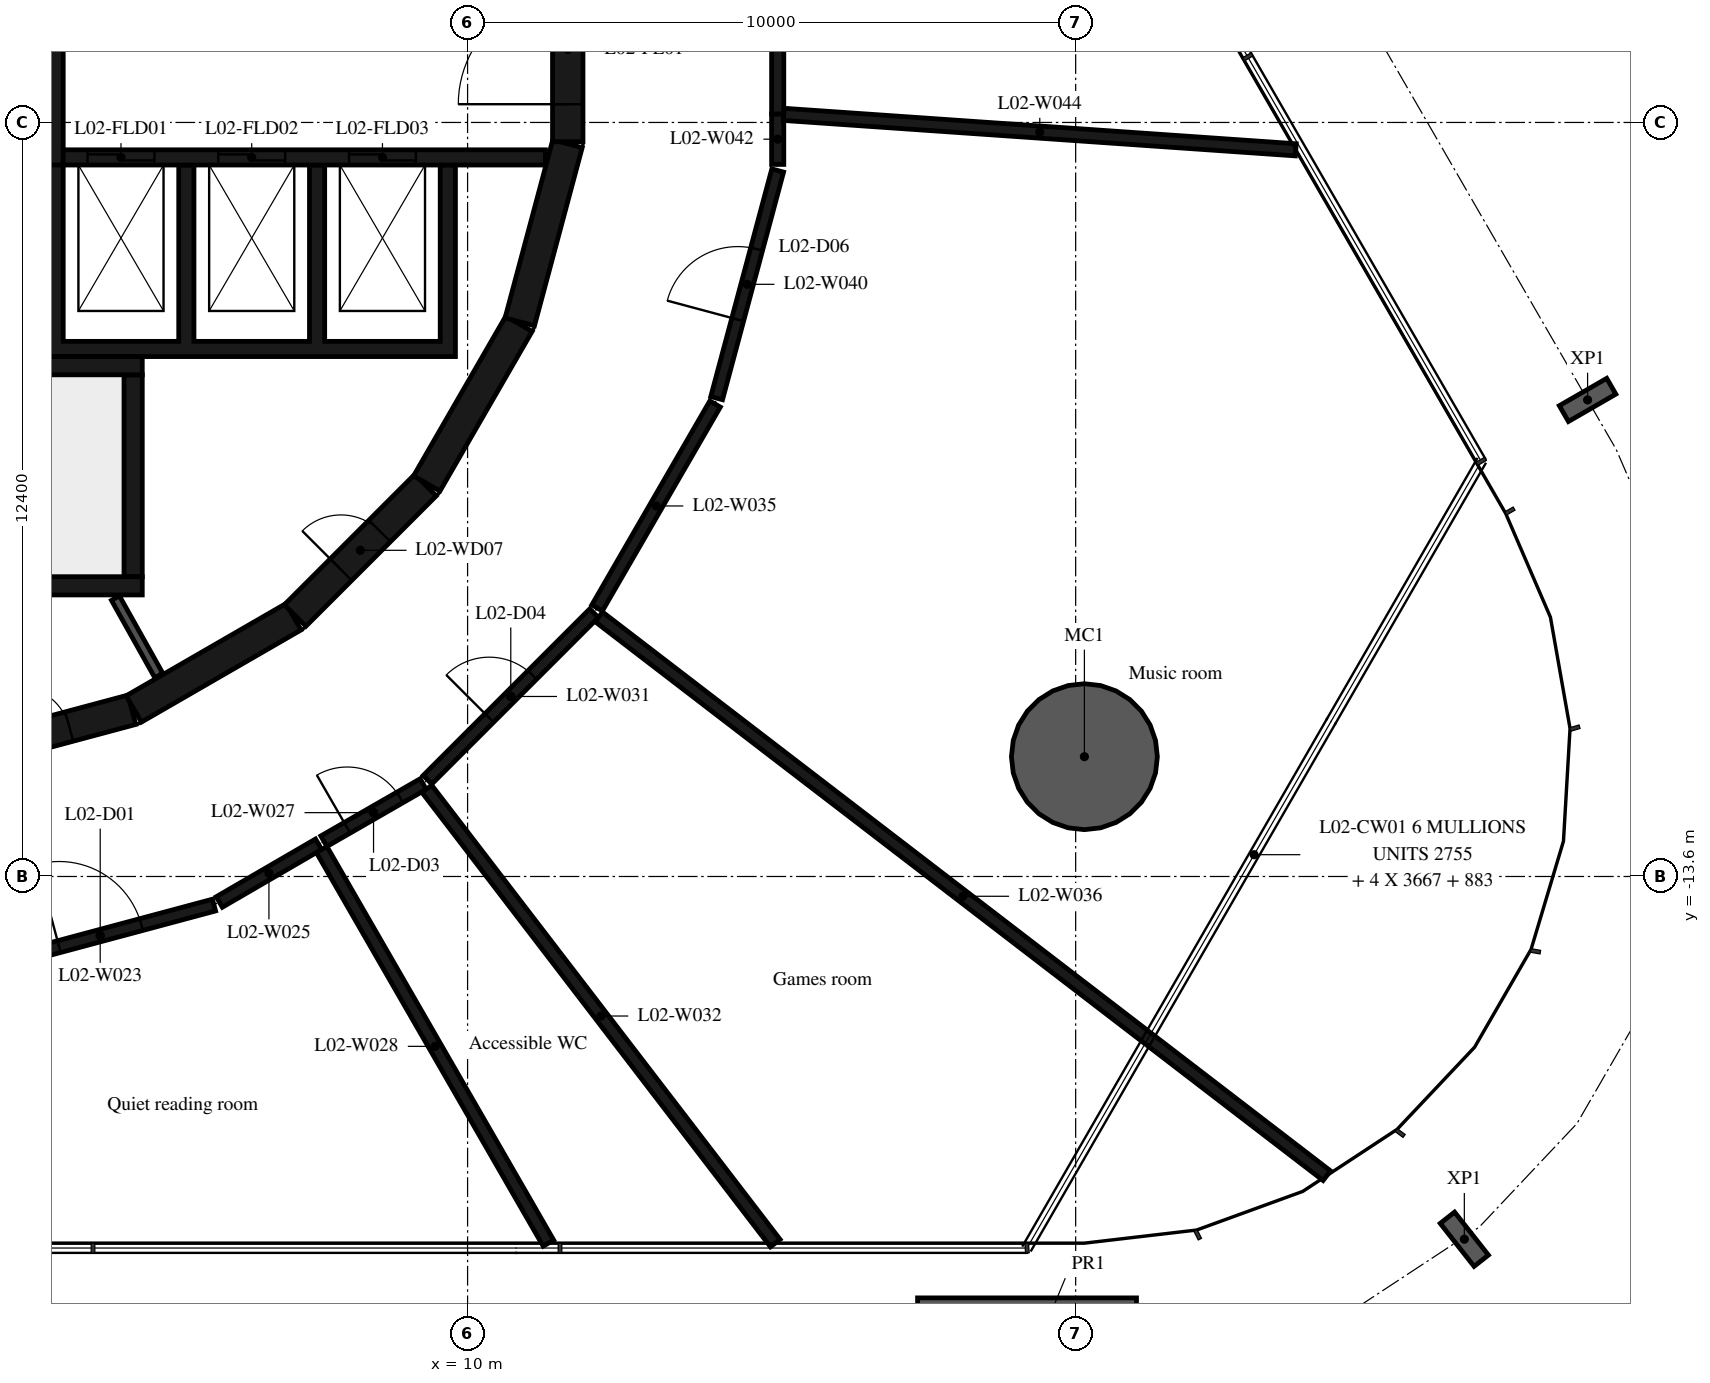
"""IFC4 building model, lengths in metres.
Left out: names, types, materials, properties, quantities, classifications, styles, units other than length and angle.
Written with IfcOpenShell. Run it as: python <this file> out.ifc"""

import sys

from ifc_helpers import new_model, si_unit, direction, frame, frame_2d, origin, origin_2d, place, context, subcontext, project, spatial, polyline, rectangle, hollow_circle, i_section, outline, extrude, element, fill, save


model = new_model("IFC4")
c1 = context("Model", 3, precision=1e-05, world=origin(), true_north=direction((0.0, 1.0)))
c2 = subcontext(c1, "Body", "Model", "MODEL_VIEW")
j1 = project(units=[si_unit("LENGTHUNIT", "METRE"), si_unit("PLANEANGLEUNIT", "RADIAN")], contexts=[c1])
p1 = place(None, origin())
s1 = spatial("IfcSite", under=j1, at=p1, CompositionType="ELEMENT")
p2 = place(p1, origin())
s2 = spatial("IfcBuilding", under=s1, at=p2, CompositionType="ELEMENT")
p3 = place(p2, frame((0.0, 0.0, 13.8)))
s3 = spatial("IfcBuildingStorey", under=s2, at=p3, CompositionType="ELEMENT", Elevation=13.8)
p4 = place(p3, frame((20.144, -11.63, -0.38), z_axis=(0.0, 0.0, 1.0), x_axis=(1.0, 0.0, 0.0)))
e1 = element("IfcColumn", 1, at=p4, inside=s3, PredefinedType="COLUMN", context=c2, shape_type="SweptSolid", body=[
    extrude(hollow_circle(Radius=1.2, WallThickness=0.06, at=origin_2d()), origin(), (0.0, 0.0, 1.0), 4.8),
])
for number, where, z_axis, x_axis in (
    (2, (26.392, -19.565, -0.38), (0.0, 0.0, 1.0), (-0.786, -0.619, 0.0)),
    (3, (28.419, -5.763, -0.38), (0.0, 0.0, 1.0), (0.5, -0.866, 0.0)),
):
    element("IfcColumn", number, at=place(p3, frame(where, z_axis=z_axis, x_axis=x_axis)), inside=s3, PredefinedType="COLUMN", context=c2, shape_type="SweptSolid", body=[
        extrude(i_section(OverallWidth=0.3, OverallDepth=0.9, WebThickness=0.019, FlangeThickness=0.035, FilletRadius=0.03, at=origin_2d()), origin(), (0.0, 0.0, 1.0), 4.8),
    ])
p5 = place(p3, frame((19.2, -21.73, -0.38), z_axis=(0.0, 0.0, 1.0), x_axis=(1.0, 0.0, 0.0)))
e4 = element("IfcColumn", 4, at=p5, inside=s3, PredefinedType="COLUMN", context=c2, shape_type="SweptSolid", body=[
    extrude(rectangle(XDim=3.6, YDim=2.4, at=origin_2d()), origin(), (0.0, 0.0, 1.0), 4.8),
])
p6 = place(p3, frame((1.55, -11.643, 0.0), z_axis=(0.0, 0.0, 1.0), x_axis=(0.965948410781, 0.258734743916, 0.0)))
e5 = element("IfcWall", 5, at=p6, inside=s3, PredefinedType="SHEAR", context=c2, shape_type="SweptSolid", body=[
    extrude(rectangle(XDim=3.033, YDim=0.5, at=frame_2d((1.516, 0.0))), origin(), (0.0, 0.0, 1.0), 4.42),
])
p7 = place(p6, frame((1.066, 0.0, 0.0)))
e6 = element("IfcOpeningElement", 6, at=p7, cuts=e5, PredefinedType="OPENING", context=c2, shape_type="SweptSolid", body=[
    extrude(rectangle(XDim=0.9, YDim=2.1, at=frame_2d((0.45, 1.05))), frame((0.0, 0.26, 0.0), z_axis=(0.0, -1.0, 0.0), x_axis=(1.0, 0.0, 0.0)), (0.0, 0.0, 1.0), 0.52),
])
p8 = place(p3, frame((4.51, -10.845, 0.0), z_axis=(0.0, 0.0, 1.0), x_axis=(0.865975092491, 0.500087131594, 0.0)))
e7 = element("IfcWall", 7, at=p8, inside=s3, PredefinedType="SHEAR", context=c2, shape_type="SweptSolid", body=[
    extrude(rectangle(XDim=3.033, YDim=0.5, at=frame_2d((1.516, 0.0))), origin(), (0.0, 0.0, 1.0), 4.42),
])
p9 = place(p3, frame((7.164, -9.308, 0.0), z_axis=(0.0, 0.0, 1.0), x_axis=(0.707106781187, 0.707106781187, 0.0)))
e8 = element("IfcWall", 8, at=p9, inside=s3, PredefinedType="SHEAR", context=c2, shape_type="SweptSolid", body=[
    extrude(rectangle(XDim=3.032, YDim=0.5, at=frame_2d((1.516, 0.0))), origin(), (0.0, 0.0, 1.0), 4.42),
])
p10 = place(p9, frame((1.066, 0.0, 0.0)))
e9 = element("IfcOpeningElement", 9, at=p10, cuts=e8, PredefinedType="OPENING", context=c2, shape_type="SweptSolid", body=[
    extrude(rectangle(XDim=0.9, YDim=2.1, at=frame_2d((0.45, 1.05))), frame((0.0, 0.26, 0.0), z_axis=(0.0, -1.0, 0.0), x_axis=(1.0, 0.0, 0.0)), (0.0, 0.0, 1.0), 0.52),
])
for number, where, z_axis, x_axis in (
    (10, (9.329, -7.137, 0.0), (0.0, 0.0, 1.0), (0.5, 0.866, 0.0)),
    (11, (10.858, -4.479, 0.0), (0.0, 0.0, 1.0), (0.259, 0.966, 0.0)),
):
    element("IfcWall", number, at=place(p3, frame(where, z_axis=z_axis, x_axis=x_axis)), inside=s3, PredefinedType="SHEAR", context=c2, shape_type="SweptSolid", body=[
        extrude(rectangle(XDim=3.033, YDim=0.5, at=frame_2d((1.516, 0.0))), origin(), (0.0, 0.0, 1.0), 4.42),
    ])
p11 = place(p3, frame((11.647, -1.516, 0.0), z_axis=(0.0, 0.0, 1.0), x_axis=(0.0, 1.0, 0.0)))
e12 = element("IfcWall", 12, at=p11, inside=s3, PredefinedType="SHEAR", context=c2, shape_type="SweptSolid", body=[
    extrude(rectangle(XDim=3.033, YDim=0.5, at=frame_2d((1.516, 0.0))), origin(), (0.0, 0.0, 1.0), 4.42),
])
p12 = place(p11, frame((0.616, 0.0, 0.0)))
e13 = element("IfcOpeningElement", 13, at=p12, cuts=e12, PredefinedType="OPENING", context=c2, shape_type="SweptSolid", body=[
    extrude(rectangle(XDim=1.8, YDim=2.1, at=frame_2d((0.9, 1.05))), frame((0.0, 0.26, 0.0), z_axis=(0.0, -1.0, 0.0), x_axis=(1.0, 0.0, 0.0)), (0.0, 0.0, 1.0), 0.52),
])
p13 = place(p3, frame((-2.4, -5.2, 0.0), z_axis=(0.0, 0.0, 1.0), x_axis=(1.0, 0.0, 0.0)))
e14 = element("IfcWall", 14, at=p13, inside=s3, PredefinedType="SHEAR", context=c2, shape_type="SweptSolid", body=[
    extrude(rectangle(XDim=7.05, YDim=0.3, at=frame_2d((3.525, 0.0))), origin(), (0.0, 0.0, 1.0), 4.42),
])
p14 = place(p3, frame((4.5, -8.67, 0.0), z_axis=(0.0, 0.0, 1.0), x_axis=(0.0, 1.0, 0.0)))
e15 = element("IfcWall", 15, at=p14, inside=s3, PredefinedType="SHEAR", context=c2, shape_type="SweptSolid", body=[
    extrude(rectangle(XDim=3.32, YDim=0.3, at=frame_2d((1.66, 0.0))), origin(), (0.0, 0.0, 1.0), 4.42),
])
p15 = place(p3, frame((0.1, -8.82, 0.0), z_axis=(0.0, 0.0, 1.0), x_axis=(1.0, 0.0, 0.0)))
e16 = element("IfcWall", 16, at=p15, inside=s3, PredefinedType="SHEAR", context=c2, shape_type="SweptSolid", body=[
    extrude(rectangle(XDim=4.55, YDim=0.3, at=frame_2d((2.275, 0.0))), origin(), (0.0, 0.0, 1.0), 4.42),
])
p16 = place(p3, origin())
e17 = element("IfcWall", 17, at=p16, inside=s3, PredefinedType="SHEAR", context=c2, shape_type="SweptSolid", body=[
    extrude(outline(polyline([(9.8, -5.05), (9.8, -4.8), (9.8, -1.9), (9.55, -1.9), (9.55, -4.8), (7.65, -4.8), (7.65, -1.9), (7.4, -1.9), (7.4, -4.8), (5.5, -4.8), (5.5, -1.9), (5.25, -1.9), (5.25, -4.8), (3.35, -4.8), (3.35, -1.9), (3.1, -1.9), (3.1, -4.8), (-5.25, -4.8), (-5.25, -1.9), (-5.5, -1.9), (-5.5, -4.8), (-7.4, -4.8), (-7.4, -1.9), (-7.65, -1.9), (-7.65, -4.8), (-9.55, -4.8), (-9.55, -1.9), (-9.8, -1.9), (-9.8, -4.8), (-9.8, -5.05), (9.8, -5.05)])), origin(), (0.0, 0.0, 1.0), 4.42),
])
p17 = place(p3, frame((3.35, -1.775, 0.0), z_axis=(0.0, 0.0, 1.0), x_axis=(1.0, 0.0, 0.0)))
e18 = element("IfcWall", 18, at=p17, inside=s3, PredefinedType="SHEAR", context=c2, shape_type="SweptSolid", body=[
    extrude(rectangle(XDim=7.93, YDim=0.25, at=frame_2d((3.965, 0.0))), origin(), (0.0, 0.0, 1.0), 4.42),
])
p18 = place(p17, frame((0.4, 0.0, 0.0)))
e19 = element("IfcOpeningElement", 19, at=p18, cuts=e18, PredefinedType="OPENING", context=c2, shape_type="SweptSolid", body=[
    extrude(rectangle(XDim=1.1, YDim=2.4, at=frame_2d((0.55, 1.2))), frame((0.0, 0.135, 0.0), z_axis=(0.0, -1.0, 0.0), x_axis=(1.0, 0.0, 0.0)), (0.0, 0.0, 1.0), 0.27),
])
p19 = place(p17, frame((2.55, 0.0, 0.0)))
e20 = element("IfcOpeningElement", 20, at=p19, cuts=e18, PredefinedType="OPENING", context=c2, shape_type="SweptSolid", body=[
    extrude(rectangle(XDim=1.1, YDim=2.4, at=frame_2d((0.55, 1.2))), frame((0.0, 0.135, 0.0), z_axis=(0.0, -1.0, 0.0), x_axis=(1.0, 0.0, 0.0)), (0.0, 0.0, 1.0), 0.27),
])
p20 = place(p17, frame((4.7, 0.0, 0.0)))
e21 = element("IfcOpeningElement", 21, at=p20, cuts=e18, PredefinedType="OPENING", context=c2, shape_type="SweptSolid", body=[
    extrude(rectangle(XDim=1.1, YDim=2.4, at=frame_2d((0.55, 1.2))), frame((0.0, 0.135, 0.0), z_axis=(0.0, -1.0, 0.0), x_axis=(1.0, 0.0, 0.0)), (0.0, 0.0, 1.0), 0.27),
])
p21 = place(p3, frame((3.225, -1.9, 0.0), z_axis=(0.0, 0.0, 1.0), x_axis=(0.0, 1.0, 0.0)))
e22 = element("IfcWall", 22, at=p21, inside=s3, PredefinedType="SHEAR", context=c2, shape_type="SweptSolid", body=[
    extrude(rectangle(XDim=3.8, YDim=0.25, at=frame_2d((1.9, 0.0))), origin(), (0.0, 0.0, 1.0), 4.42),
])
p22 = place(p3, frame((4.922, -10.296, 0.0), z_axis=(0.0, 0.0, 1.0), x_axis=(-0.48860846254, 0.872503163509, 0.0)))
e23 = element("IfcWall", 23, at=p22, inside=s3, PredefinedType="PARTITIONING", context=c2, shape_type="SweptSolid", body=[
    extrude(rectangle(XDim=1.459, YDim=0.15, at=frame_2d((0.73, 0.0))), origin(), (0.0, 0.0, 1.0), 4.42),
])
p23 = place(p3, frame((2.087, -15.074, 0.0), z_axis=(0.0, 0.0, 1.0), x_axis=(0.965870133458, 0.259026804199, 0.0)))
e24 = element("IfcWall", 24, at=p23, inside=s3, PredefinedType="PARTITIONING", context=c2, shape_type="SweptSolid", body=[
    extrude(rectangle(XDim=3.876, YDim=0.2, at=frame_2d((1.938, 0.0))), origin(), (0.0, 0.0, 1.0), 4.42),
])
p24 = place(p23, frame((1.238, 0.0, 0.0)))
e25 = element("IfcOpeningElement", 25, at=p24, cuts=e24, PredefinedType="OPENING", context=c2, shape_type="SweptSolid", body=[
    extrude(rectangle(XDim=1.4, YDim=2.1, at=frame_2d((0.7, 1.05))), frame((0.0, 0.11, 0.0), z_axis=(0.0, -1.0, 0.0), x_axis=(1.0, 0.0, 0.0)), (0.0, 0.0, 1.0), 0.22),
])
p25 = place(p3, frame((5.917, -14.02, 0.0), z_axis=(0.0, 0.0, 1.0), x_axis=(0.864513714777, 0.502609228887, 0.0)))
e26 = element("IfcWall", 26, at=p25, inside=s3, PredefinedType="PARTITIONING", context=c2, shape_type="SweptSolid", body=[
    extrude(rectangle(XDim=1.89, YDim=0.2, at=frame_2d((0.945, 0.0))), origin(), (0.0, 0.0, 1.0), 4.42),
])
p26 = place(p3, frame((7.637, -13.02, 0.0), z_axis=(0.0, 0.0, 1.0), x_axis=(0.86672429601, 0.49878752461, 0.0)))
e27 = element("IfcWall", 27, at=p26, inside=s3, PredefinedType="PARTITIONING", context=c2, shape_type="SweptSolid", body=[
    extrude(rectangle(XDim=1.885, YDim=0.2, at=frame_2d((0.942, 0.0))), origin(), (0.0, 0.0, 1.0), 4.42),
])
p27 = place(p26, frame((0.442, 0.0, 0.0)))
e28 = element("IfcOpeningElement", 28, at=p27, cuts=e27, PredefinedType="OPENING", context=c2, shape_type="SweptSolid", body=[
    extrude(rectangle(XDim=1.0, YDim=2.1, at=frame_2d((0.5, 1.05))), frame((0.0, 0.11, 0.0), z_axis=(0.0, -1.0, 0.0), x_axis=(1.0, 0.0, 0.0)), (0.0, 0.0, 1.0), 0.22),
])
p28 = place(p3, frame((7.6, -13.157, 0.0), z_axis=(0.0, 0.0, 1.0), x_axis=(0.499292387003, -0.866433559069, 0.0)))
e29 = element("IfcWall", 29, at=p28, inside=s3, PredefinedType="PARTITIONING", context=c2, shape_type="SweptSolid", body=[
    extrude(rectangle(XDim=7.471, YDim=0.2, at=frame_2d((3.735, 0.0))), origin(), (0.0, 0.0, 1.0), 4.42),
])
p29 = place(p3, frame((9.341, -12.009, 0.0), z_axis=(0.0, 0.0, 1.0), x_axis=(0.707106781187, 0.707106781187, 0.0)))
e30 = element("IfcWall", 30, at=p29, inside=s3, PredefinedType="PARTITIONING", context=c2, shape_type="SweptSolid", body=[
    extrude(rectangle(XDim=3.874, YDim=0.2, at=frame_2d((1.937, 0.0))), origin(), (0.0, 0.0, 1.0), 4.42),
])
p30 = place(p29, frame((1.437, 0.0, 0.0)))
e31 = element("IfcOpeningElement", 31, at=p30, cuts=e30, PredefinedType="OPENING", context=c2, shape_type="SweptSolid", body=[
    extrude(rectangle(XDim=1.0, YDim=2.1, at=frame_2d((0.5, 1.05))), frame((0.0, 0.11, 0.0), z_axis=(0.0, -1.0, 0.0), x_axis=(1.0, 0.0, 0.0)), (0.0, 0.0, 1.0), 0.22),
])
p31 = place(p3, frame((9.331, -12.159, 0.0), z_axis=(0.0, 0.0, 1.0), x_axis=(0.608558385637, -0.793509099677, 0.0)))
e32 = element("IfcWall", 32, at=p31, inside=s3, PredefinedType="PARTITIONING", context=c2, shape_type="SweptSolid", body=[
    extrude(rectangle(XDim=9.415, YDim=0.2, at=frame_2d((4.707, 0.0))), origin(), (0.0, 0.0, 1.0), 4.42),
])
p32 = place(p3, frame((12.13, -9.183, 0.0), z_axis=(0.0, 0.0, 1.0), x_axis=(0.500760497952, 0.865585884642, 0.0)))
e33 = element("IfcWall", 33, at=p32, inside=s3, PredefinedType="PARTITIONING", context=c2, shape_type="SweptSolid", body=[
    extrude(rectangle(XDim=3.874, YDim=0.2, at=frame_2d((1.937, 0.0))), origin(), (0.0, 0.0, 1.0), 4.42),
])
p33 = place(p3, frame((12.159, -9.331, 0.0), z_axis=(0.0, 0.0, 1.0), x_axis=(0.793226820575, -0.608926277246, 0.0)))
e34 = element("IfcWall", 34, at=p33, inside=s3, PredefinedType="PARTITIONING", context=c2, shape_type="SweptSolid", body=[
    extrude(rectangle(XDim=15.091, YDim=0.2, at=frame_2d((7.545, 0.0))), origin(), (0.0, 0.0, 1.0), 4.42),
])
p34 = place(p3, frame((14.096, -5.733, 0.0), z_axis=(0.0, 0.0, 1.0), x_axis=(0.259085569159, 0.96585437197, 0.0)))
e35 = element("IfcWall", 35, at=p34, inside=s3, PredefinedType="PARTITIONING", context=c2, shape_type="SweptSolid", body=[
    extrude(rectangle(XDim=3.876, YDim=0.2, at=frame_2d((1.938, 0.0))), origin(), (0.0, 0.0, 1.0), 4.42),
])
p35 = place(p34, frame((1.338, 0.0, 0.0)))
e36 = element("IfcOpeningElement", 36, at=p35, cuts=e35, PredefinedType="OPENING", context=c2, shape_type="SweptSolid", body=[
    extrude(rectangle(XDim=1.2, YDim=2.1, at=frame_2d((0.6, 1.05))), frame((0.0, 0.11, 0.0), z_axis=(0.0, -1.0, 0.0), x_axis=(1.0, 0.0, 0.0)), (0.0, 0.0, 1.0), 0.22),
])
p36 = place(p3, frame((15.1, -1.89, 0.0), z_axis=(0.0, 0.0, 1.0), x_axis=(0.0, 1.0, 0.0)))
e37 = element("IfcWall", 37, at=p36, inside=s3, PredefinedType="PARTITIONING", context=c2, shape_type="SweptSolid", body=[
    extrude(rectangle(XDim=0.83, YDim=0.2, at=frame_2d((0.415, 0.0))), origin(), (0.0, 0.0, 1.0), 4.42),
])
p37 = place(p3, frame((15.1, -1.06, 0.0), z_axis=(0.0, 0.0, 1.0), x_axis=(0.0, 1.0, 0.0)))
e38 = element("IfcWall", 38, at=p37, inside=s3, PredefinedType="PARTITIONING", context=c2, shape_type="SweptSolid", body=[
    extrude(rectangle(XDim=3.05, YDim=0.2, at=frame_2d((1.525, 0.0))), origin(), (0.0, 0.0, 1.0), 4.42),
])
p38 = place(p3, frame((15.2, -1.067, 0.0), z_axis=(0.0, 0.0, 1.0), x_axis=(0.997611670562, -0.069072098269, 0.0)))
e39 = element("IfcWall", 39, at=p38, inside=s3, PredefinedType="PARTITIONING", context=c2, shape_type="SweptSolid", body=[
    extrude(rectangle(XDim=8.441, YDim=0.2, at=frame_2d((4.22, 0.0))), origin(), (0.0, 0.0, 1.0), 4.42),
])
p39 = place(p12, origin())
e40 = element("IfcDoor", 40, at=p39, inside=s3, OperationType="DOUBLE_DOOR_SINGLE_SWING", PredefinedType="DOOR", context=c2, shape_type="SweptSolid", body=[
    extrude(rectangle(XDim=1.8, YDim=2.1, at=frame_2d((0.9, 1.05))), frame((0.0, 0.025, 0.0), z_axis=(0.0, -1.0, 0.0), x_axis=(1.0, 0.0, 0.0)), (0.0, 0.0, 1.0), 0.05),
])
fill(e13, e40)
p40 = place(p18, origin())
e41 = element("IfcDoor", 41, at=p40, inside=s3, OperationType="DOUBLE_DOOR_SLIDING", PredefinedType="DOOR", context=c2, shape_type="SweptSolid", body=[
    extrude(rectangle(XDim=1.1, YDim=2.4, at=frame_2d((0.55, 1.2))), frame((0.0, 0.025, 0.0), z_axis=(0.0, -1.0, 0.0), x_axis=(1.0, 0.0, 0.0)), (0.0, 0.0, 1.0), 0.05),
])
fill(e19, e41)
p41 = place(p19, origin())
e42 = element("IfcDoor", 42, at=p41, inside=s3, OperationType="DOUBLE_DOOR_SLIDING", PredefinedType="DOOR", context=c2, shape_type="SweptSolid", body=[
    extrude(rectangle(XDim=1.1, YDim=2.4, at=frame_2d((0.55, 1.2))), frame((0.0, 0.025, 0.0), z_axis=(0.0, -1.0, 0.0), x_axis=(1.0, 0.0, 0.0)), (0.0, 0.0, 1.0), 0.05),
])
fill(e20, e42)
p42 = place(p20, origin())
e43 = element("IfcDoor", 43, at=p42, inside=s3, OperationType="DOUBLE_DOOR_SLIDING", PredefinedType="DOOR", context=c2, shape_type="SweptSolid", body=[
    extrude(rectangle(XDim=1.1, YDim=2.4, at=frame_2d((0.55, 1.2))), frame((0.0, 0.025, 0.0), z_axis=(0.0, -1.0, 0.0), x_axis=(1.0, 0.0, 0.0)), (0.0, 0.0, 1.0), 0.05),
])
fill(e21, e43)
p43 = place(p10, origin())
e44 = element("IfcDoor", 44, at=p43, inside=s3, OperationType="SINGLE_SWING_RIGHT", PredefinedType="DOOR", context=c2, shape_type="SweptSolid", body=[
    extrude(rectangle(XDim=0.9, YDim=2.1, at=frame_2d((0.45, 1.05))), frame((0.0, 0.025, 0.0), z_axis=(0.0, -1.0, 0.0), x_axis=(1.0, 0.0, 0.0)), (0.0, 0.0, 1.0), 0.05),
])
fill(e9, e44)
p44 = place(p7, origin())
e45 = element("IfcDoor", 45, at=p44, inside=s3, OperationType="SINGLE_SWING_LEFT", PredefinedType="DOOR", context=c2, shape_type="SweptSolid", body=[
    extrude(rectangle(XDim=0.9, YDim=2.1, at=frame_2d((0.45, 1.05))), frame((0.0, 0.025, 0.0), z_axis=(0.0, -1.0, 0.0), x_axis=(1.0, 0.0, 0.0)), (0.0, 0.0, 1.0), 0.05),
])
fill(e6, e45)
p45 = place(p24, origin())
e46 = element("IfcDoor", 46, at=p45, inside=s3, OperationType="DOUBLE_DOOR_SINGLE_SWING", PredefinedType="DOOR", context=c2, shape_type="SweptSolid", body=[
    extrude(rectangle(XDim=1.4, YDim=2.1, at=frame_2d((0.7, 1.05))), frame((0.0, 0.025, 0.0), z_axis=(0.0, -1.0, 0.0), x_axis=(1.0, 0.0, 0.0)), (0.0, 0.0, 1.0), 0.05),
])
fill(e25, e46)
p46 = place(p27, origin())
e47 = element("IfcDoor", 47, at=p46, inside=s3, OperationType="SINGLE_SWING_LEFT", PredefinedType="DOOR", context=c2, shape_type="SweptSolid", body=[
    extrude(rectangle(XDim=1.0, YDim=2.1, at=frame_2d((0.5, 1.05))), frame((0.0, 0.025, 0.0), z_axis=(0.0, -1.0, 0.0), x_axis=(1.0, 0.0, 0.0)), (0.0, 0.0, 1.0), 0.05),
])
fill(e28, e47)
p47 = place(p30, origin())
e48 = element("IfcDoor", 48, at=p47, inside=s3, OperationType="SINGLE_SWING_LEFT", PredefinedType="DOOR", context=c2, shape_type="SweptSolid", body=[
    extrude(rectangle(XDim=1.0, YDim=2.1, at=frame_2d((0.5, 1.05))), frame((0.0, 0.025, 0.0), z_axis=(0.0, -1.0, 0.0), x_axis=(1.0, 0.0, 0.0)), (0.0, 0.0, 1.0), 0.05),
])
fill(e31, e48)
p48 = place(p35, origin())
e49 = element("IfcDoor", 49, at=p48, inside=s3, OperationType="SINGLE_SWING_LEFT", PredefinedType="DOOR", context=c2, shape_type="SweptSolid", body=[
    extrude(rectangle(XDim=1.2, YDim=2.1, at=frame_2d((0.6, 1.05))), frame((0.0, 0.025, 0.0), z_axis=(0.0, -1.0, 0.0), x_axis=(1.0, 0.0, 0.0)), (0.0, 0.0, 1.0), 0.05),
])
fill(e36, e49)
save(model, sys.argv[1])
